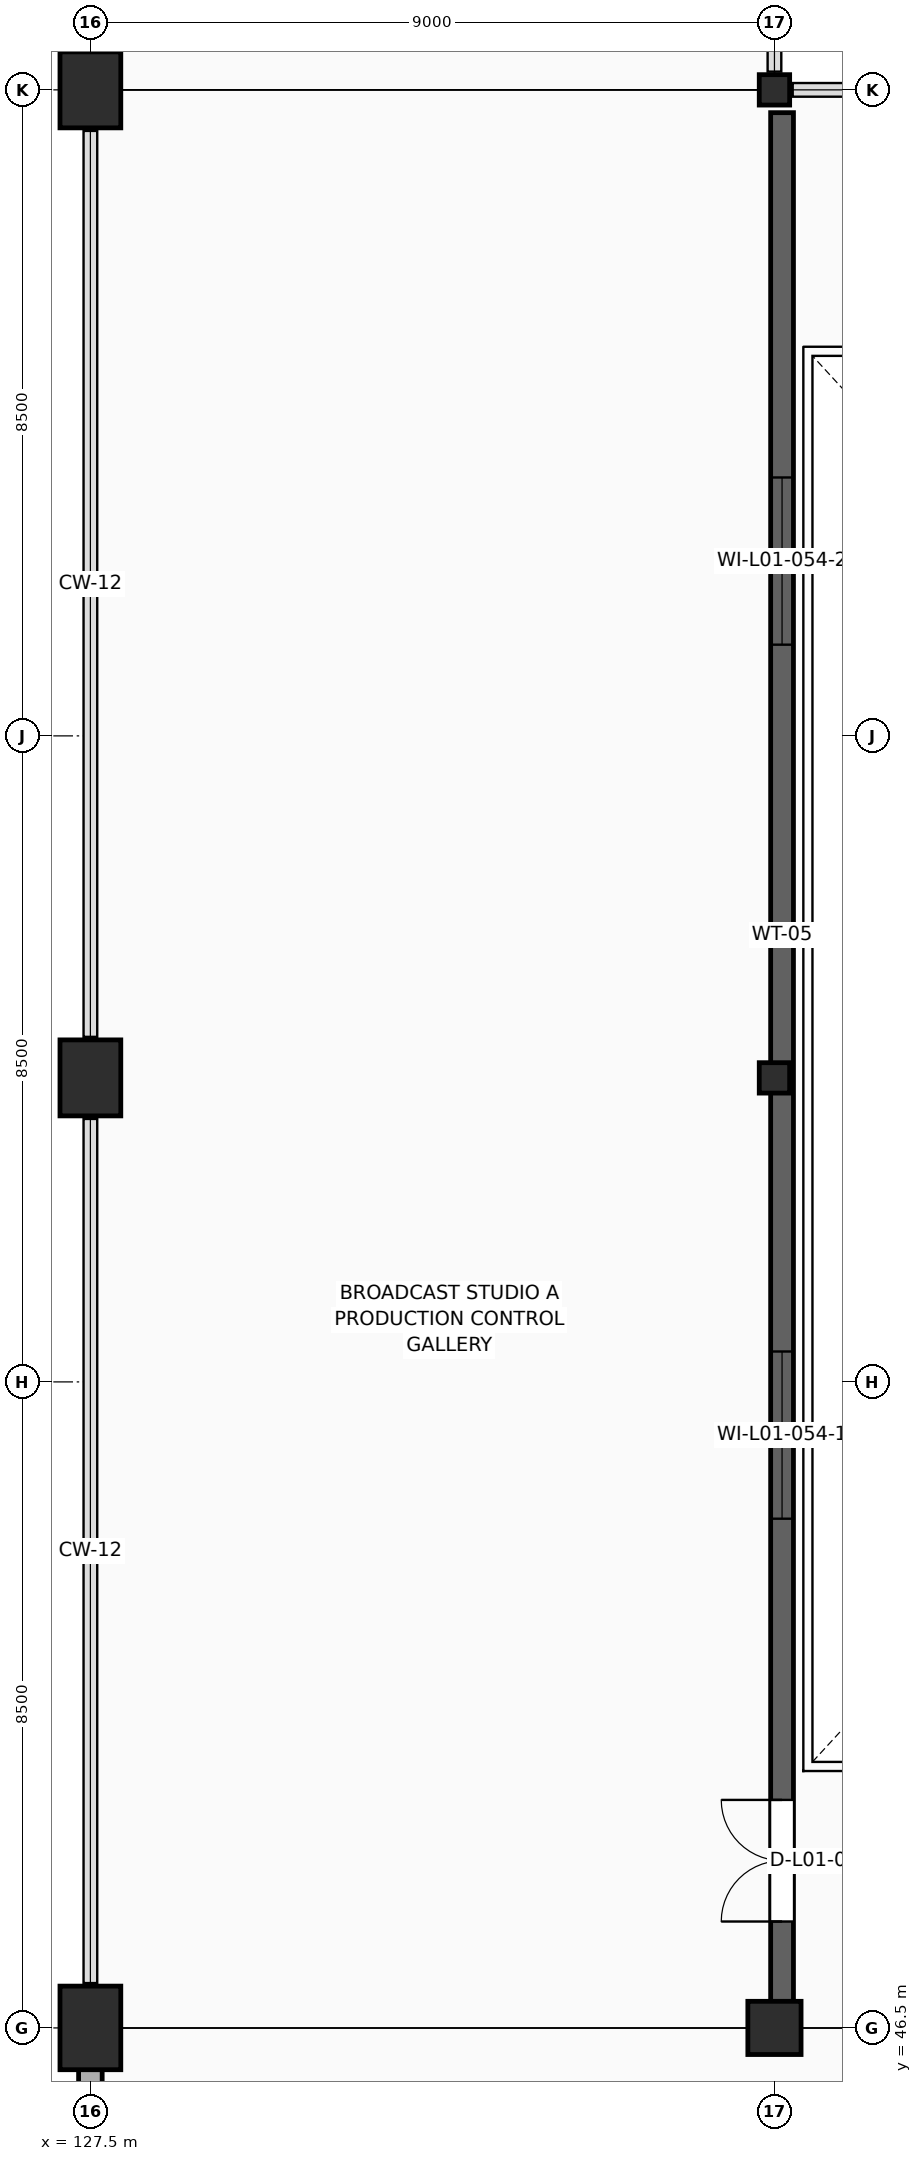
"""IFC4 building model, lengths in metres.
Left out: names, types, materials, properties, quantities, classifications, styles, units other than length and angle.
Written with IfcOpenShell. Run it as: python <this file> out.ifc"""

import sys

from ifc_helpers import new_model, si_unit, direction, frame, frame_2d, origin, origin_2d, place, context, subcontext, project, spatial, rectangle, hollow_rectangle, extrude, element, fill, save


model = new_model("IFC4")
c1 = context("Model", 3, precision=1e-05, world=origin(), true_north=direction((0.0, 1.0)))
c2 = subcontext(c1, "Body", "Model", "MODEL_VIEW")
j1 = project(units=[si_unit("LENGTHUNIT", "METRE"), si_unit("PLANEANGLEUNIT", "RADIAN")], contexts=[c1])
p1 = place(None, origin())
s1 = spatial("IfcSite", under=j1, at=p1, CompositionType="ELEMENT")
p2 = place(p1, origin())
s2 = spatial("IfcBuilding", under=s1, at=p2, CompositionType="ELEMENT")
p3 = place(p2, frame((0.0, 0.0, 5.4)))
s3 = spatial("IfcBuildingStorey", under=s2, at=p3, CompositionType="ELEMENT", Elevation=5.4)
p4 = place(p3, frame((127.5, 46.5, 0.0), z_axis=(0.0, 0.0, 1.0), x_axis=(1.0, 0.0, 0.0)))
e1 = element("IfcColumn", 1, at=p4, inside=s3, PredefinedType="COLUMN", context=c2, shape_type="SweptSolid", body=[
    extrude(rectangle(XDim=0.8, YDim=1.1, at=origin_2d()), origin(), (0.0, 0.0, 1.0), 4.7),
])
p5 = place(p3, frame((136.5, 46.5, 0.0), z_axis=(0.0, 0.0, 1.0), x_axis=(1.0, 0.0, 0.0)))
e2 = element("IfcColumn", 2, at=p5, inside=s3, PredefinedType="COLUMN", context=c2, shape_type="SweptSolid", body=[
    extrude(rectangle(XDim=0.7, YDim=0.7, at=origin_2d()), origin(), (0.0, 0.0, 1.0), 4.7),
])
for number, where, z_axis, x_axis in (
    (3, (127.5, 59.0, 0.0), (0.0, 0.0, 1.0), (1.0, 0.0, 0.0)),
    (4, (127.5, 72.0, 0.0), (0.0, 0.0, 1.0), (1.0, 0.0, 0.0)),
):
    element("IfcColumn", number, at=place(p3, frame(where, z_axis=z_axis, x_axis=x_axis)), inside=s3, PredefinedType="COLUMN", context=c2, shape_type="SweptSolid", body=[
        extrude(rectangle(XDim=0.8, YDim=1.0, at=origin_2d()), origin(), (0.0, 0.0, 1.0), 4.7),
    ])
for number, where, z_axis, x_axis in (
    (5, (136.5, 59.0, 0.0), (0.0, 0.0, 1.0), (1.0, 0.0, 0.0)),
    (6, (136.5, 72.0, 0.0), (0.0, 0.0, 1.0), (1.0, 0.0, 0.0)),
):
    element("IfcColumn", number, at=place(p3, frame(where, z_axis=z_axis, x_axis=x_axis)), inside=s3, PredefinedType="COLUMN", context=c2, shape_type="SweptSolid", body=[
        extrude(hollow_rectangle(XDim=0.4, YDim=0.4, WallThickness=0.016, at=origin_2d()), origin(), (0.0, 0.0, 1.0), 4.7),
    ])
p6 = place(p3, frame((127.5, 36.8, 0.0), z_axis=(0.0, 0.0, 1.0), x_axis=(0.0, 1.0, 0.0)))
e7 = element("IfcWall", 7, at=p6, inside=s3, PredefinedType="STANDARD", context=c2, shape_type="SweptSolid", body=[
    extrude(rectangle(XDim=9.7, YDim=0.31, at=frame_2d((4.85, 0.0))), origin(), (0.0, 0.0, 1.0), 4.248),
])
p7 = place(p6, frame((1.625, 0.0, 1.0)))
e8 = element("IfcOpeningElement", 8, at=p7, cuts=e7, PredefinedType="OPENING", context=c2, shape_type="SweptSolid", body=[
    extrude(rectangle(XDim=1.6, YDim=2.2, at=frame_2d((0.8, 1.1))), frame((0.0, 0.167, 0.0), z_axis=(0.0, -1.0, 0.0), x_axis=(1.0, 0.0, 0.0)), (0.0, 0.0, 1.0), 0.334),
])
p8 = place(p6, frame((6.475, 0.0, 1.0)))
e9 = element("IfcOpeningElement", 9, at=p8, cuts=e7, PredefinedType="OPENING", context=c2, shape_type="SweptSolid", body=[
    extrude(rectangle(XDim=1.6, YDim=2.2, at=frame_2d((0.8, 1.1))), frame((0.0, 0.167, 0.0), z_axis=(0.0, -1.0, 0.0), x_axis=(1.0, 0.0, 0.0)), (0.0, 0.0, 1.0), 0.334),
])
p9 = place(p3, frame((136.6, 46.7, 0.0), z_axis=(0.0, 0.0, 1.0), x_axis=(0.0, 1.0, 0.0)))
e10 = element("IfcWall", 10, at=p9, inside=s3, PredefinedType="STANDARD", context=c2, shape_type="SweptSolid", body=[
    extrude(rectangle(XDim=25.0, YDim=0.3, at=frame_2d((12.5, 0.0))), origin(), (0.0, 0.0, 1.0), 4.5),
])
p10 = place(p9, frame((1.2, 0.0, 0.0)))
e11 = element("IfcOpeningElement", 11, at=p10, cuts=e10, PredefinedType="OPENING", context=c2, shape_type="SweptSolid", body=[
    extrude(rectangle(XDim=1.6, YDim=2.4, at=frame_2d((0.8, 1.2))), frame((0.0, 0.162, 0.0), z_axis=(0.0, -1.0, 0.0), x_axis=(1.0, 0.0, 0.0)), (0.0, 0.0, 1.0), 0.324),
])
p11 = place(p9, frame((6.5, 0.0, 1.05)))
e12 = element("IfcOpeningElement", 12, at=p11, cuts=e10, PredefinedType="OPENING", context=c2, shape_type="SweptSolid", body=[
    extrude(rectangle(XDim=2.2, YDim=1.2, at=frame_2d((1.1, 0.6))), frame((0.0, 0.162, 0.0), z_axis=(0.0, -1.0, 0.0), x_axis=(1.0, 0.0, 0.0)), (0.0, 0.0, 1.0), 0.324),
])
p12 = place(p9, frame((18.0, 0.0, 1.05)))
e13 = element("IfcOpeningElement", 13, at=p12, cuts=e10, PredefinedType="OPENING", context=c2, shape_type="SweptSolid", body=[
    extrude(rectangle(XDim=2.2, YDim=1.2, at=frame_2d((1.1, 0.6))), frame((0.0, 0.162, 0.0), z_axis=(0.0, -1.0, 0.0), x_axis=(1.0, 0.0, 0.0)), (0.0, 0.0, 1.0), 0.324),
])
p13 = place(p10, origin())
e14 = element("IfcDoor", 14, at=p13, inside=s3, OperationType="DOUBLE_DOOR_SINGLE_SWING", PredefinedType="DOOR", context=c2, shape_type="SweptSolid", body=[
    extrude(rectangle(XDim=1.6, YDim=2.4, at=frame_2d((0.8, 1.2))), frame((0.0, 0.025, 0.0), z_axis=(0.0, -1.0, 0.0), x_axis=(1.0, 0.0, 0.0)), (0.0, 0.0, 1.0), 0.05),
])
fill(e11, e14)
p14 = place(p11, origin())
e15 = element("IfcWindow", 15, at=p14, inside=s3, PartitioningType="SINGLE_PANEL", PredefinedType="WINDOW", context=c2, shape_type="SweptSolid", body=[
    extrude(rectangle(XDim=2.2, YDim=1.2, at=frame_2d((1.1, 0.6))), frame((0.0, 0.03, 0.0), z_axis=(0.0, -1.0, 0.0), x_axis=(1.0, 0.0, 0.0)), (0.0, 0.0, 1.0), 0.06),
])
fill(e12, e15)
p15 = place(p12, origin())
e16 = element("IfcWindow", 16, at=p15, inside=s3, PartitioningType="SINGLE_PANEL", PredefinedType="WINDOW", context=c2, shape_type="SweptSolid", body=[
    extrude(rectangle(XDim=2.2, YDim=1.2, at=frame_2d((1.1, 0.6))), frame((0.0, 0.03, 0.0), z_axis=(0.0, -1.0, 0.0), x_axis=(1.0, 0.0, 0.0)), (0.0, 0.0, 1.0), 0.06),
])
fill(e13, e16)
save(model, sys.argv[1])
